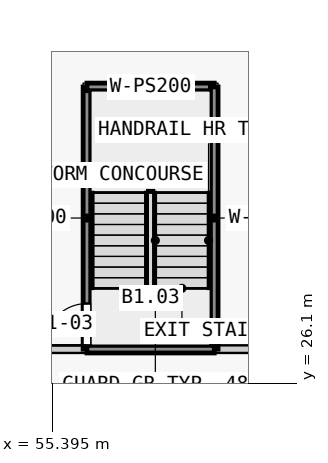
"""IFC4 building model, lengths in metres.
Left out: names, types, materials, properties, quantities, classifications, styles, units other than length and angle.
Written with IfcOpenShell. Run it as: python <this file> out.ifc"""

import sys

from ifc_helpers import new_model, si_unit, direction, frame, frame_2d, origin, place, context, subcontext, project, spatial, rectangle, extrude, element, fill, save


model = new_model("IFC4")
c1 = context("Model", 3, precision=1e-05, world=origin(), true_north=direction((0.0, 1.0)))
c2 = subcontext(c1, "Body", "Model", "MODEL_VIEW")
j1 = project(units=[si_unit("LENGTHUNIT", "METRE"), si_unit("PLANEANGLEUNIT", "RADIAN")], contexts=[c1])
p1 = place(None, origin())
s1 = spatial("IfcSite", under=j1, at=p1, CompositionType="ELEMENT")
p2 = place(p1, origin())
s2 = spatial("IfcBuilding", under=s1, at=p2, CompositionType="ELEMENT")
p3 = place(p2, frame((0.0, 0.0, -7.0)))
s3 = spatial("IfcBuildingStorey", under=s2, at=p3, CompositionType="ELEMENT", Elevation=-7.0)
p4 = place(p3, frame((59.65, 27.0, 0.0), z_axis=(0.0, 0.0, 1.0), x_axis=(1.0, 0.0, 0.0)))
e1 = element("IfcWall", 1, at=p4, inside=s3, PredefinedType="PARTITIONING", context=c2, shape_type="SweptSolid", body=[
    extrude(rectangle(XDim=2.75, YDim=0.2, at=frame_2d((1.375, 0.0))), origin(), (0.0, 0.0, 1.0), 6.55),
])
p5 = place(p3, frame((54.6, 27.0, 0.0), z_axis=(0.0, 0.0, 1.0), x_axis=(1.0, 0.0, 0.0)))
e2 = element("IfcWall", 2, at=p5, inside=s3, PredefinedType="PARTITIONING", context=c2, shape_type="SweptSolid", body=[
    extrude(rectangle(XDim=1.7, YDim=0.2, at=frame_2d((0.85, 0.0))), origin(), (0.0, 0.0, 1.0), 6.55),
])
p6 = place(p3, frame((56.3, 27.0, 0.0), z_axis=(0.0, 0.0, 1.0), x_axis=(0.0, 1.0, 0.0)))
e3 = element("IfcWall", 3, at=p6, inside=s3, PredefinedType="PARTITIONING", context=c2, shape_type="SweptSolid", body=[
    extrude(rectangle(XDim=6.9, YDim=0.2, at=frame_2d((3.45, 0.0))), origin(), (0.0, 0.0, 1.0), 6.55),
])
p7 = place(p6, frame((0.1, 0.0, 0.0)))
e4 = element("IfcOpeningElement", 4, at=p7, cuts=e3, PredefinedType="OPENING", context=c2, shape_type="SweptSolid", body=[
    extrude(rectangle(XDim=1.1, YDim=2.1, at=frame_2d((0.55, 1.05))), frame((0.0, 0.11, 0.0), z_axis=(0.0, -1.0, 0.0), x_axis=(1.0, 0.0, 0.0)), (0.0, 0.0, 1.0), 0.22),
])
p8 = place(p3, frame((56.3, 33.9, 0.0), z_axis=(0.0, 0.0, 1.0), x_axis=(1.0, 0.0, 0.0)))
e5 = element("IfcWall", 5, at=p8, inside=s3, PredefinedType="PARTITIONING", context=c2, shape_type="SweptSolid", body=[
    extrude(rectangle(XDim=3.35, YDim=0.2, at=frame_2d((1.675, 0.0))), origin(), (0.0, 0.0, 1.0), 6.55),
])
p9 = place(p3, frame((59.65, 33.9, 0.0), z_axis=(0.0, 0.0, 1.0), x_axis=(0.0, -1.0, 0.0)))
e6 = element("IfcWall", 6, at=p9, inside=s3, PredefinedType="PARTITIONING", context=c2, shape_type="SweptSolid", body=[
    extrude(rectangle(XDim=6.9, YDim=0.2, at=frame_2d((3.45, 0.0))), origin(), (0.0, 0.0, 1.0), 6.55),
])
p10 = place(p3, frame((59.65, 27.0, 0.0), z_axis=(0.0, 0.0, 1.0), x_axis=(-1.0, 0.0, 0.0)))
e7 = element("IfcWall", 7, at=p10, inside=s3, PredefinedType="PARTITIONING", context=c2, shape_type="SweptSolid", body=[
    extrude(rectangle(XDim=3.35, YDim=0.2, at=frame_2d((1.675, 0.0))), origin(), (0.0, 0.0, 1.0), 6.55),
])
p11 = place(p7, origin())
e8 = element("IfcDoor", 8, at=p11, inside=s3, OperationType="SINGLE_SWING_LEFT", PredefinedType="DOOR", context=c2, shape_type="SweptSolid", body=[
    extrude(rectangle(XDim=1.1, YDim=2.1, at=frame_2d((0.55, 1.05))), frame((0.0, 0.025, 0.0), z_axis=(0.0, -1.0, 0.0), x_axis=(1.0, 0.0, 0.0)), (0.0, 0.0, 1.0), 0.05),
])
fill(e4, e8)
save(model, sys.argv[1])
